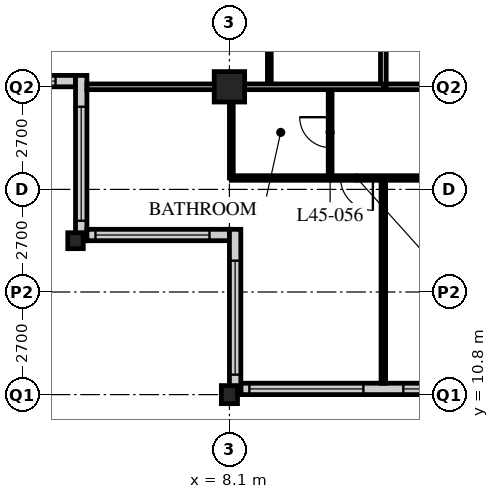
"""IFC4 building model, lengths in metres.
Left out: names, types, materials, properties, quantities, classifications, styles, units other than length and angle.
Written with IfcOpenShell. Run it as: python <this file> out.ifc"""

import sys

from ifc_helpers import new_model, si_unit, direction, frame, frame_2d, origin, origin_2d, place, context, subcontext, project, spatial, rectangle, hollow_rectangle, i_section, extrude, element, fill, save


model = new_model("IFC4")
c1 = context("Model", 3, precision=1e-05, world=origin(), true_north=direction((0.0, 1.0)))
c2 = subcontext(c1, "Body", "Model", "MODEL_VIEW")
j1 = project(units=[si_unit("LENGTHUNIT", "METRE"), si_unit("PLANEANGLEUNIT", "RADIAN")], contexts=[c1])
p1 = place(None, origin())
s1 = spatial("IfcSite", under=j1, at=p1, CompositionType="ELEMENT")
p2 = place(p1, origin())
s2 = spatial("IfcBuilding", under=s1, at=p2, CompositionType="ELEMENT")
p3 = place(p2, frame((0.0, 0.0, 177.6)))
s3 = spatial("IfcBuildingStorey", under=s2, at=p3, CompositionType="ELEMENT", Elevation=177.6)
p4 = place(p3, frame((4.05, 14.85, 0.0), z_axis=(0.0, 0.0, 1.0), x_axis=(1.0, 0.0, 0.0)))
e1 = element("IfcColumn", 1, at=p4, inside=s3, PredefinedType="COLUMN", context=c2, shape_type="SweptSolid", body=[
    extrude(i_section(OverallWidth=0.407, OverallDepth=0.419, WebThickness=0.031, FlangeThickness=0.049, FilletRadius=0.015, at=origin_2d()), origin(), (0.0, 0.0, 1.0), 3.6),
])
p5 = place(p3, frame((8.1, 10.8, 0.0), z_axis=(0.0, 0.0, 1.0), x_axis=(1.0, 0.0, 0.0)))
e2 = element("IfcColumn", 2, at=p5, inside=s3, PredefinedType="COLUMN", context=c2, shape_type="SweptSolid", body=[
    extrude(i_section(OverallWidth=0.424, OverallDepth=0.475, WebThickness=0.048, FlangeThickness=0.077, FilletRadius=0.015, at=origin_2d()), origin(), (0.0, 0.0, 1.0), 3.6),
])
p6 = place(p3, frame((8.1, 18.9, 0.0), z_axis=(0.0, 0.0, 1.0), x_axis=(1.0, 0.0, 0.0)))
e3 = element("IfcColumn", 3, at=p6, inside=s3, PredefinedType="COLUMN", context=c2, shape_type="SweptSolid", body=[
    extrude(hollow_rectangle(XDim=0.8, YDim=0.8, WallThickness=0.08, at=origin_2d()), origin(), (0.0, 0.0, 1.0), 3.6),
])
p7 = place(p3, frame((8.4, 10.95, 0.0), z_axis=(0.0, 0.0, 1.0), x_axis=(1.0, 0.0, 0.0)))
e4 = element("IfcWall", 4, at=p7, inside=s3, PredefinedType="SOLIDWALL", context=c2, shape_type="SweptSolid", body=[
    extrude(rectangle(XDim=40.2, YDim=0.3, at=frame_2d((20.1, 0.0))), origin(), (0.0, 0.0, 1.0), 3.39),
])
p8 = place(p7, frame((0.225, 0.0, 0.6)))
e5 = element("IfcOpeningElement", 5, at=p8, cuts=e4, PredefinedType="OPENING", context=c2, shape_type="SweptSolid", body=[
    extrude(rectangle(XDim=3.0, YDim=2.4, at=frame_2d((1.5, 1.2))), frame((0.0, 0.16, 0.0), z_axis=(0.0, -1.0, 0.0), x_axis=(1.0, 0.0, 0.0)), (0.0, 0.0, 1.0), 0.32),
])
p9 = place(p7, frame((4.275, 0.0, 0.6)))
e6 = element("IfcOpeningElement", 6, at=p9, cuts=e4, PredefinedType="OPENING", context=c2, shape_type="SweptSolid", body=[
    extrude(rectangle(XDim=3.0, YDim=2.4, at=frame_2d((1.5, 1.2))), frame((0.0, 0.16, 0.0), z_axis=(0.0, -1.0, 0.0), x_axis=(1.0, 0.0, 0.0)), (0.0, 0.0, 1.0), 0.32),
])
p10 = place(p7, frame((8.325, 0.0, 0.6)))
e7 = element("IfcOpeningElement", 7, at=p10, cuts=e4, PredefinedType="OPENING", context=c2, shape_type="SweptSolid", body=[
    extrude(rectangle(XDim=3.0, YDim=2.4, at=frame_2d((1.5, 1.2))), frame((0.0, 0.16, 0.0), z_axis=(0.0, -1.0, 0.0), x_axis=(1.0, 0.0, 0.0)), (0.0, 0.0, 1.0), 0.32),
])
p11 = place(p7, frame((12.375, 0.0, 0.6)))
e8 = element("IfcOpeningElement", 8, at=p11, cuts=e4, PredefinedType="OPENING", context=c2, shape_type="SweptSolid", body=[
    extrude(rectangle(XDim=3.0, YDim=2.4, at=frame_2d((1.5, 1.2))), frame((0.0, 0.16, 0.0), z_axis=(0.0, -1.0, 0.0), x_axis=(1.0, 0.0, 0.0)), (0.0, 0.0, 1.0), 0.32),
])
p12 = place(p7, frame((16.425, 0.0, 0.6)))
e9 = element("IfcOpeningElement", 9, at=p12, cuts=e4, PredefinedType="OPENING", context=c2, shape_type="SweptSolid", body=[
    extrude(rectangle(XDim=3.0, YDim=2.4, at=frame_2d((1.5, 1.2))), frame((0.0, 0.16, 0.0), z_axis=(0.0, -1.0, 0.0), x_axis=(1.0, 0.0, 0.0)), (0.0, 0.0, 1.0), 0.32),
])
p13 = place(p7, frame((20.475, 0.0, 0.6)))
e10 = element("IfcOpeningElement", 10, at=p13, cuts=e4, PredefinedType="OPENING", context=c2, shape_type="SweptSolid", body=[
    extrude(rectangle(XDim=3.0, YDim=2.4, at=frame_2d((1.5, 1.2))), frame((0.0, 0.16, 0.0), z_axis=(0.0, -1.0, 0.0), x_axis=(1.0, 0.0, 0.0)), (0.0, 0.0, 1.0), 0.32),
])
p14 = place(p7, frame((24.525, 0.0, 0.6)))
e11 = element("IfcOpeningElement", 11, at=p14, cuts=e4, PredefinedType="OPENING", context=c2, shape_type="SweptSolid", body=[
    extrude(rectangle(XDim=3.0, YDim=2.4, at=frame_2d((1.5, 1.2))), frame((0.0, 0.16, 0.0), z_axis=(0.0, -1.0, 0.0), x_axis=(1.0, 0.0, 0.0)), (0.0, 0.0, 1.0), 0.32),
])
p15 = place(p7, frame((28.575, 0.0, 0.6)))
e12 = element("IfcOpeningElement", 12, at=p15, cuts=e4, PredefinedType="OPENING", context=c2, shape_type="SweptSolid", body=[
    extrude(rectangle(XDim=3.0, YDim=2.4, at=frame_2d((1.5, 1.2))), frame((0.0, 0.16, 0.0), z_axis=(0.0, -1.0, 0.0), x_axis=(1.0, 0.0, 0.0)), (0.0, 0.0, 1.0), 0.32),
])
p16 = place(p7, frame((32.625, 0.0, 0.6)))
e13 = element("IfcOpeningElement", 13, at=p16, cuts=e4, PredefinedType="OPENING", context=c2, shape_type="SweptSolid", body=[
    extrude(rectangle(XDim=3.0, YDim=2.4, at=frame_2d((1.5, 1.2))), frame((0.0, 0.16, 0.0), z_axis=(0.0, -1.0, 0.0), x_axis=(1.0, 0.0, 0.0)), (0.0, 0.0, 1.0), 0.32),
])
p17 = place(p7, frame((36.675, 0.0, 0.6)))
e14 = element("IfcOpeningElement", 14, at=p17, cuts=e4, PredefinedType="OPENING", context=c2, shape_type="SweptSolid", body=[
    extrude(rectangle(XDim=3.0, YDim=2.4, at=frame_2d((1.5, 1.2))), frame((0.0, 0.16, 0.0), z_axis=(0.0, -1.0, 0.0), x_axis=(1.0, 0.0, 0.0)), (0.0, 0.0, 1.0), 0.32),
])
p18 = place(p3, frame((0.3, 19.05, 0.0), z_axis=(0.0, 0.0, 1.0), x_axis=(1.0, 0.0, 0.0)))
e15 = element("IfcWall", 15, at=p18, inside=s3, PredefinedType="SOLIDWALL", context=c2, shape_type="SweptSolid", body=[
    extrude(rectangle(XDim=3.75, YDim=0.3, at=frame_2d((1.875, 0.0))), origin(), (0.0, 0.0, 1.0), 3.39),
])
p19 = place(p18, frame((0.225, 0.0, 0.6)))
e16 = element("IfcOpeningElement", 16, at=p19, cuts=e15, PredefinedType="OPENING", context=c2, shape_type="SweptSolid", body=[
    extrude(rectangle(XDim=3.0, YDim=2.0, at=frame_2d((1.5, 1.0))), frame((0.0, 0.16, 0.0), z_axis=(0.0, -1.0, 0.0), x_axis=(1.0, 0.0, 0.0)), (0.0, 0.0, 1.0), 0.32),
])
p20 = place(p3, frame((4.2, 19.2, 0.0), z_axis=(0.0, 0.0, 1.0), x_axis=(0.0, -1.0, 0.0)))
e17 = element("IfcWall", 17, at=p20, inside=s3, PredefinedType="SOLIDWALL", context=c2, shape_type="SweptSolid", body=[
    extrude(rectangle(XDim=4.35, YDim=0.3, at=frame_2d((2.175, 0.0))), origin(), (0.0, 0.0, 1.0), 3.39),
])
p21 = place(p20, frame((0.825, 0.0, 0.6)))
e18 = element("IfcOpeningElement", 18, at=p21, cuts=e17, PredefinedType="OPENING", context=c2, shape_type="SweptSolid", body=[
    extrude(rectangle(XDim=3.0, YDim=2.0, at=frame_2d((1.5, 1.0))), frame((0.0, 0.16, 0.0), z_axis=(0.0, -1.0, 0.0), x_axis=(1.0, 0.0, 0.0)), (0.0, 0.0, 1.0), 0.32),
])
p22 = place(p3, frame((4.35, 15.0, 0.0), z_axis=(0.0, 0.0, 1.0), x_axis=(1.0, 0.0, 0.0)))
e19 = element("IfcWall", 19, at=p22, inside=s3, PredefinedType="SOLIDWALL", context=c2, shape_type="SweptSolid", body=[
    extrude(rectangle(XDim=3.75, YDim=0.3, at=frame_2d((1.875, 0.0))), origin(), (0.0, 0.0, 1.0), 3.39),
])
p23 = place(p22, frame((0.225, 0.0, 0.6)))
e20 = element("IfcOpeningElement", 20, at=p23, cuts=e19, PredefinedType="OPENING", context=c2, shape_type="SweptSolid", body=[
    extrude(rectangle(XDim=3.0, YDim=2.0, at=frame_2d((1.5, 1.0))), frame((0.0, 0.16, 0.0), z_axis=(0.0, -1.0, 0.0), x_axis=(1.0, 0.0, 0.0)), (0.0, 0.0, 1.0), 0.32),
])
p24 = place(p3, frame((8.25, 15.15, 0.0), z_axis=(0.0, 0.0, 1.0), x_axis=(0.0, -1.0, 0.0)))
e21 = element("IfcWall", 21, at=p24, inside=s3, PredefinedType="SOLIDWALL", context=c2, shape_type="SweptSolid", body=[
    extrude(rectangle(XDim=4.35, YDim=0.3, at=frame_2d((2.175, 0.0))), origin(), (0.0, 0.0, 1.0), 3.39),
])
p25 = place(p24, frame((0.825, 0.0, 0.6)))
e22 = element("IfcOpeningElement", 22, at=p25, cuts=e21, PredefinedType="OPENING", context=c2, shape_type="SweptSolid", body=[
    extrude(rectangle(XDim=3.0, YDim=2.0, at=frame_2d((1.5, 1.0))), frame((0.0, 0.16, 0.0), z_axis=(0.0, -1.0, 0.0), x_axis=(1.0, 0.0, 0.0)), (0.0, 0.0, 1.0), 0.32),
])
p26 = place(p3, frame((12.15, 18.9, 0.0), z_axis=(0.0, 0.0, 1.0), x_axis=(1.0, 0.0, 0.0)))
e23 = element("IfcWall", 23, at=p26, inside=s3, PredefinedType="PARTITIONING", context=c2, shape_type="SweptSolid", body=[
    extrude(rectangle(XDim=32.4, YDim=0.15, at=frame_2d((16.2, 0.0))), origin(), (0.0, 0.0, 1.0), 2.778),
])
p27 = place(p26, frame((6.4, 0.0, 0.0)))
e24 = element("IfcOpeningElement", 24, at=p27, cuts=e23, PredefinedType="OPENING", context=c2, shape_type="SweptSolid", body=[
    extrude(rectangle(XDim=1.0, YDim=2.1, at=frame_2d((0.5, 1.05))), frame((0.0, 0.085, 0.0), z_axis=(0.0, -1.0, 0.0), x_axis=(1.0, 0.0, 0.0)), (0.0, 0.0, 1.0), 0.17),
])
p28 = place(p26, frame((8.8, 0.0, 0.0)))
e25 = element("IfcOpeningElement", 25, at=p28, cuts=e23, PredefinedType="OPENING", context=c2, shape_type="SweptSolid", body=[
    extrude(rectangle(XDim=1.0, YDim=2.1, at=frame_2d((0.5, 1.05))), frame((0.0, 0.085, 0.0), z_axis=(0.0, -1.0, 0.0), x_axis=(1.0, 0.0, 0.0)), (0.0, 0.0, 1.0), 0.17),
])
p29 = place(p26, frame((13.05, 0.0, 0.0)))
e26 = element("IfcOpeningElement", 26, at=p29, cuts=e23, PredefinedType="OPENING", context=c2, shape_type="SweptSolid", body=[
    extrude(rectangle(XDim=1.0, YDim=2.1, at=frame_2d((0.5, 1.05))), frame((0.0, 0.085, 0.0), z_axis=(0.0, -1.0, 0.0), x_axis=(1.0, 0.0, 0.0)), (0.0, 0.0, 1.0), 0.17),
])
p30 = place(p26, frame((22.6, 0.0, 0.0)))
e27 = element("IfcOpeningElement", 27, at=p30, cuts=e23, PredefinedType="OPENING", context=c2, shape_type="SweptSolid", body=[
    extrude(rectangle(XDim=1.0, YDim=2.1, at=frame_2d((0.5, 1.05))), frame((0.0, 0.085, 0.0), z_axis=(0.0, -1.0, 0.0), x_axis=(1.0, 0.0, 0.0)), (0.0, 0.0, 1.0), 0.17),
])
p31 = place(p26, frame((25.0, 0.0, 0.0)))
e28 = element("IfcOpeningElement", 28, at=p31, cuts=e23, PredefinedType="OPENING", context=c2, shape_type="SweptSolid", body=[
    extrude(rectangle(XDim=1.0, YDim=2.1, at=frame_2d((0.5, 1.05))), frame((0.0, 0.085, 0.0), z_axis=(0.0, -1.0, 0.0), x_axis=(1.0, 0.0, 0.0)), (0.0, 0.0, 1.0), 0.17),
])
p32 = place(p26, frame((1.525, 0.0, 0.0)))
e29 = element("IfcOpeningElement", 29, at=p32, cuts=e23, PredefinedType="OPENING", context=c2, shape_type="SweptSolid", body=[
    extrude(rectangle(XDim=1.0, YDim=2.1, at=frame_2d((0.5, 1.05))), frame((0.0, 0.085, 0.0), z_axis=(0.0, -1.0, 0.0), x_axis=(1.0, 0.0, 0.0)), (0.0, 0.0, 1.0), 0.17),
])
p33 = place(p26, frame((29.875, 0.0, 0.0)))
e30 = element("IfcOpeningElement", 30, at=p33, cuts=e23, PredefinedType="OPENING", context=c2, shape_type="SweptSolid", body=[
    extrude(rectangle(XDim=1.0, YDim=2.1, at=frame_2d((0.5, 1.05))), frame((0.0, 0.085, 0.0), z_axis=(0.0, -1.0, 0.0), x_axis=(1.0, 0.0, 0.0)), (0.0, 0.0, 1.0), 0.17),
])
p34 = place(p3, frame((12.15, 18.9, 0.0), z_axis=(0.0, 0.0, 1.0), x_axis=(0.0, 1.0, 0.0)))
e31 = element("IfcWall", 31, at=p34, inside=s3, PredefinedType="PARTITIONING", context=c2, shape_type="SweptSolid", body=[
    extrude(rectangle(XDim=24.3, YDim=0.15, at=frame_2d((12.15, 0.0))), origin(), (0.0, 0.0, 1.0), 3.39),
])
p35 = place(p34, frame((2.35, 0.0, 0.0)))
e32 = element("IfcOpeningElement", 32, at=p35, cuts=e31, PredefinedType="OPENING", context=c2, shape_type="SweptSolid", body=[
    extrude(rectangle(XDim=1.0, YDim=2.1, at=frame_2d((0.5, 1.05))), frame((0.0, 0.085, 0.0), z_axis=(0.0, -1.0, 0.0), x_axis=(1.0, 0.0, 0.0)), (0.0, 0.0, 1.0), 0.17),
])
p36 = place(p34, frame((6.4, 0.0, 0.0)))
e33 = element("IfcOpeningElement", 33, at=p36, cuts=e31, PredefinedType="OPENING", context=c2, shape_type="SweptSolid", body=[
    extrude(rectangle(XDim=1.0, YDim=2.1, at=frame_2d((0.5, 1.05))), frame((0.0, 0.085, 0.0), z_axis=(0.0, -1.0, 0.0), x_axis=(1.0, 0.0, 0.0)), (0.0, 0.0, 1.0), 0.17),
])
p37 = place(p34, frame((8.5, 0.0, 0.0)))
e34 = element("IfcOpeningElement", 34, at=p37, cuts=e31, PredefinedType="OPENING", context=c2, shape_type="SweptSolid", body=[
    extrude(rectangle(XDim=1.0, YDim=2.1, at=frame_2d((0.5, 1.05))), frame((0.0, 0.085, 0.0), z_axis=(0.0, -1.0, 0.0), x_axis=(1.0, 0.0, 0.0)), (0.0, 0.0, 1.0), 0.17),
])
p38 = place(p34, frame((16.6, 0.0, 0.0)))
e35 = element("IfcOpeningElement", 35, at=p38, cuts=e31, PredefinedType="OPENING", context=c2, shape_type="SweptSolid", body=[
    extrude(rectangle(XDim=1.0, YDim=2.1, at=frame_2d((0.5, 1.05))), frame((0.0, 0.085, 0.0), z_axis=(0.0, -1.0, 0.0), x_axis=(1.0, 0.0, 0.0)), (0.0, 0.0, 1.0), 0.17),
])
p39 = place(p3, frame((9.15, 18.9, 0.0), z_axis=(0.0, 0.0, 1.0), x_axis=(0.0, 1.0, 0.0)))
e36 = element("IfcWall", 36, at=p39, inside=s3, PredefinedType="PARTITIONING", context=c2, shape_type="SweptSolid", body=[
    extrude(rectangle(XDim=2.2, YDim=0.1, at=frame_2d((1.1, 0.0))), origin(), (0.0, 0.0, 1.0), 3.39),
])
p40 = place(p3, frame((10.75, 18.9, 0.0), z_axis=(0.0, 0.0, 1.0), x_axis=(0.0, -1.0, 0.0)))
e37 = element("IfcWall", 37, at=p40, inside=s3, PredefinedType="PARTITIONING", context=c2, shape_type="SweptSolid", body=[
    extrude(rectangle(XDim=2.4, YDim=0.1, at=frame_2d((1.2, 0.0))), origin(), (0.0, 0.0, 1.0), 3.39),
])
p41 = place(p40, frame((0.8, 0.0, 0.0)))
e38 = element("IfcOpeningElement", 38, at=p41, cuts=e37, PredefinedType="OPENING", context=c2, shape_type="SweptSolid", body=[
    extrude(rectangle(XDim=0.8, YDim=2.1, at=frame_2d((0.4, 1.05))), frame((0.0, 0.06, 0.0), z_axis=(0.0, -1.0, 0.0), x_axis=(1.0, 0.0, 0.0)), (0.0, 0.0, 1.0), 0.12),
])
p42 = place(p3, frame((8.15, 18.9, 0.0), z_axis=(0.0, 0.0, 1.0), x_axis=(0.0, -1.0, 0.0)))
e39 = element("IfcWall", 39, at=p42, inside=s3, PredefinedType="PARTITIONING", context=c2, shape_type="SweptSolid", body=[
    extrude(rectangle(XDim=2.4, YDim=0.1, at=frame_2d((1.2, 0.0))), origin(), (0.0, 0.0, 1.0), 2.778),
])
p43 = place(p3, frame((8.15, 16.5, 0.0), z_axis=(0.0, 0.0, 1.0), x_axis=(1.0, 0.0, 0.0)))
e40 = element("IfcWall", 40, at=p43, inside=s3, PredefinedType="PARTITIONING", context=c2, shape_type="SweptSolid", body=[
    extrude(rectangle(XDim=8.05, YDim=0.12, at=frame_2d((4.025, 0.0))), origin(), (0.0, 0.0, 1.0), 3.39),
])
p44 = place(p43, frame((6.725, 0.0, 0.0)))
e41 = element("IfcOpeningElement", 41, at=p44, cuts=e40, PredefinedType="OPENING", context=c2, shape_type="SweptSolid", body=[
    extrude(rectangle(XDim=0.85, YDim=2.1, at=frame_2d((0.425, 1.05))), frame((0.0, 0.07, 0.0), z_axis=(0.0, -1.0, 0.0), x_axis=(1.0, 0.0, 0.0)), (0.0, 0.0, 1.0), 0.14),
])
p45 = place(p43, frame((2.875, 0.0, 0.0)))
e42 = element("IfcOpeningElement", 42, at=p45, cuts=e40, PredefinedType="OPENING", context=c2, shape_type="SweptSolid", body=[
    extrude(rectangle(XDim=0.85, YDim=2.1, at=frame_2d((0.425, 1.05))), frame((0.0, 0.07, 0.0), z_axis=(0.0, -1.0, 0.0), x_axis=(1.0, 0.0, 0.0)), (0.0, 0.0, 1.0), 0.14),
])
p46 = place(p3, frame((12.15, 16.5, 0.0), z_axis=(0.0, 0.0, 1.0), x_axis=(0.0, -1.0, 0.0)))
e43 = element("IfcWall", 43, at=p46, inside=s3, PredefinedType="PARTITIONING", context=c2, shape_type="SweptSolid", body=[
    extrude(rectangle(XDim=5.4, YDim=0.12, at=frame_2d((2.7, 0.0))), origin(), (0.0, 0.0, 1.0), 3.39),
])
p47 = place(p3, frame((4.35, 18.9, 0.0), z_axis=(0.0, 0.0, 1.0), x_axis=(1.0, 0.0, 0.0)))
e44 = element("IfcWall", 44, at=p47, inside=s3, PredefinedType="PARTITIONING", context=c2, shape_type="SweptSolid", body=[
    extrude(rectangle(XDim=7.8, YDim=0.15, at=frame_2d((3.9, 0.0))), origin(), (0.0, 0.0, 1.0), 2.778),
])
p48 = place(p8, origin())
e45 = element("IfcWindow", 45, at=p48, inside=s3, PartitioningType="SINGLE_PANEL", PredefinedType="WINDOW", context=c2, shape_type="SweptSolid", body=[
    extrude(rectangle(XDim=3.0, YDim=2.4, at=frame_2d((1.5, 1.2))), frame((0.0, 0.03, 0.0), z_axis=(0.0, -1.0, 0.0), x_axis=(1.0, 0.0, 0.0)), (0.0, 0.0, 1.0), 0.06),
])
fill(e5, e45)
p49 = place(p9, origin())
e46 = element("IfcWindow", 46, at=p49, inside=s3, PartitioningType="SINGLE_PANEL", PredefinedType="WINDOW", context=c2, shape_type="SweptSolid", body=[
    extrude(rectangle(XDim=3.0, YDim=2.4, at=frame_2d((1.5, 1.2))), frame((0.0, 0.03, 0.0), z_axis=(0.0, -1.0, 0.0), x_axis=(1.0, 0.0, 0.0)), (0.0, 0.0, 1.0), 0.06),
])
fill(e6, e46)
p50 = place(p19, origin())
e47 = element("IfcWindow", 47, at=p50, inside=s3, PartitioningType="SINGLE_PANEL", PredefinedType="WINDOW", context=c2, shape_type="SweptSolid", body=[
    extrude(rectangle(XDim=3.0, YDim=2.0, at=frame_2d((1.5, 1.0))), frame((0.0, 0.03, 0.0), z_axis=(0.0, -1.0, 0.0), x_axis=(1.0, 0.0, 0.0)), (0.0, 0.0, 1.0), 0.06),
])
fill(e16, e47)
p51 = place(p21, origin())
e48 = element("IfcWindow", 48, at=p51, inside=s3, PartitioningType="SINGLE_PANEL", PredefinedType="WINDOW", context=c2, shape_type="SweptSolid", body=[
    extrude(rectangle(XDim=3.0, YDim=2.0, at=frame_2d((1.5, 1.0))), frame((0.0, 0.03, 0.0), z_axis=(0.0, -1.0, 0.0), x_axis=(1.0, 0.0, 0.0)), (0.0, 0.0, 1.0), 0.06),
])
fill(e18, e48)
p52 = place(p23, origin())
e49 = element("IfcWindow", 49, at=p52, inside=s3, PartitioningType="SINGLE_PANEL", PredefinedType="WINDOW", context=c2, shape_type="SweptSolid", body=[
    extrude(rectangle(XDim=3.0, YDim=2.0, at=frame_2d((1.5, 1.0))), frame((0.0, 0.03, 0.0), z_axis=(0.0, -1.0, 0.0), x_axis=(1.0, 0.0, 0.0)), (0.0, 0.0, 1.0), 0.06),
])
fill(e20, e49)
p53 = place(p25, origin())
e50 = element("IfcWindow", 50, at=p53, inside=s3, PartitioningType="SINGLE_PANEL", PredefinedType="WINDOW", context=c2, shape_type="SweptSolid", body=[
    extrude(rectangle(XDim=3.0, YDim=2.0, at=frame_2d((1.5, 1.0))), frame((0.0, 0.03, 0.0), z_axis=(0.0, -1.0, 0.0), x_axis=(1.0, 0.0, 0.0)), (0.0, 0.0, 1.0), 0.06),
])
fill(e22, e50)
p54 = place(p41, origin())
e51 = element("IfcDoor", 51, at=p54, inside=s3, OperationType="SINGLE_SWING_RIGHT", PredefinedType="DOOR", context=c2, shape_type="SweptSolid", body=[
    extrude(rectangle(XDim=0.8, YDim=2.1, at=frame_2d((0.4, 1.05))), frame((0.0, 0.025, 0.0), z_axis=(0.0, -1.0, 0.0), x_axis=(1.0, 0.0, 0.0)), (0.0, 0.0, 1.0), 0.05),
])
fill(e38, e51)
p55 = place(p45, origin())
e52 = element("IfcDoor", 52, at=p55, inside=s3, OperationType="SINGLE_SWING_LEFT", PredefinedType="DOOR", context=c2, shape_type="SweptSolid", body=[
    extrude(rectangle(XDim=0.85, YDim=2.1, at=frame_2d((0.425, 1.05))), frame((0.0, 0.025, 0.0), z_axis=(0.0, -1.0, 0.0), x_axis=(1.0, 0.0, 0.0)), (0.0, 0.0, 1.0), 0.05),
])
fill(e42, e52)
save(model, sys.argv[1])
